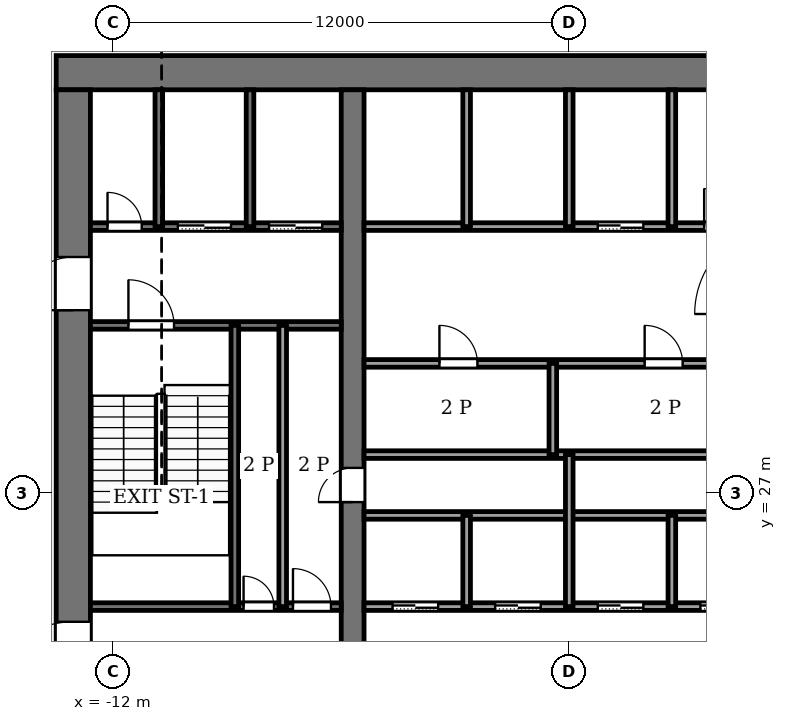
"""IFC4 building model, lengths in metres.
Left out: names, types, materials, properties, quantities, classifications, styles, units other than length and angle.
Written with IfcOpenShell. Run it as: python <this file> out.ifc"""

import sys

from ifc_helpers import new_model, si_unit, direction, frame, frame_2d, origin, place, context, subcontext, project, spatial, rectangle, extrude, element, fill, save


model = new_model("IFC4")
c1 = context("Model", 3, precision=1e-05, world=origin(), true_north=direction((0.0, 1.0)))
c2 = subcontext(c1, "Body", "Model", "MODEL_VIEW")
j1 = project(units=[si_unit("LENGTHUNIT", "METRE"), si_unit("PLANEANGLEUNIT", "RADIAN")], contexts=[c1])
p1 = place(None, origin())
s1 = spatial("IfcSite", under=j1, at=p1, CompositionType="ELEMENT")
p2 = place(p1, origin())
s2 = spatial("IfcBuilding", under=s1, at=p2, CompositionType="ELEMENT")
p3 = place(p2, frame((0.0, 0.0, 202.0)))
s3 = spatial("IfcBuildingStorey", under=s2, at=p3, CompositionType="ELEMENT", Elevation=202.0)
p4 = place(p3, frame((-13.5, 38.05, -0.13), z_axis=(0.0, 0.0, 1.0), x_axis=(1.0, 0.0, 0.0)))
e1 = element("IfcWall", 1, at=p4, inside=s3, PredefinedType="SHEAR", context=c2, shape_type="SweptSolid", body=[
    extrude(rectangle(XDim=27.0, YDim=0.9, at=frame_2d((13.5, 0.0))), origin(), (0.0, 0.0, 1.0), 4.0),
])
p5 = place(p3, frame((-13.05, 18.4, -0.13), z_axis=(0.0, 0.0, 1.0), x_axis=(0.0, 1.0, 0.0)))
e2 = element("IfcWall", 2, at=p5, inside=s3, PredefinedType="SHEAR", context=c2, shape_type="SweptSolid", body=[
    extrude(rectangle(XDim=19.2, YDim=0.9, at=frame_2d((9.6, 0.0))), origin(), (0.0, 0.0, 1.0), 4.0),
])
p6 = place(p5, frame((2.8, 0.0, 0.13)))
e3 = element("IfcOpeningElement", 3, at=p6, cuts=e2, PredefinedType="OPENING", context=c2, shape_type="SweptSolid", body=[
    extrude(rectangle(XDim=2.4, YDim=2.4, at=frame_2d((1.2, 1.2))), frame((0.0, 0.46, 0.0), z_axis=(0.0, -1.0, 0.0), x_axis=(1.0, 0.0, 0.0)), (0.0, 0.0, 1.0), 0.92),
])
p7 = place(p5, frame((13.4, 0.0, 0.13)))
e4 = element("IfcOpeningElement", 4, at=p7, cuts=e2, PredefinedType="OPENING", context=c2, shape_type="SweptSolid", body=[
    extrude(rectangle(XDim=1.4, YDim=2.2, at=frame_2d((0.7, 1.1))), frame((0.0, 0.46, 0.0), z_axis=(0.0, -1.0, 0.0), x_axis=(1.0, 0.0, 0.0)), (0.0, 0.0, 1.0), 0.92),
])
p8 = place(p3, frame((-5.7, 18.4, -0.13), z_axis=(0.0, 0.0, 1.0), x_axis=(0.0, 1.0, 0.0)))
e5 = element("IfcWall", 5, at=p8, inside=s3, PredefinedType="SHEAR", context=c2, shape_type="SweptSolid", body=[
    extrude(rectangle(XDim=19.2, YDim=0.6, at=frame_2d((9.6, 0.0))), origin(), (0.0, 0.0, 1.0), 4.0),
])
p9 = place(p8, frame((8.35, 0.0, 0.13)))
e6 = element("IfcOpeningElement", 6, at=p9, cuts=e5, PredefinedType="OPENING", context=c2, shape_type="SweptSolid", body=[
    extrude(rectangle(XDim=0.9, YDim=2.1, at=frame_2d((0.45, 1.05))), frame((0.0, 0.31, 0.0), z_axis=(0.0, -1.0, 0.0), x_axis=(1.0, 0.0, 0.0)), (0.0, 0.0, 1.0), 0.62),
])
p10 = place(p3, frame((-12.6, 24.0, 0.0), z_axis=(0.0, 0.0, 1.0), x_axis=(1.0, 0.0, 0.0)))
e7 = element("IfcWall", 7, at=p10, inside=s3, PredefinedType="PARTITIONING", context=c2, shape_type="SweptSolid", body=[
    extrude(rectangle(XDim=6.6, YDim=0.2, at=frame_2d((3.3, 0.0))), origin(), (0.0, 0.0, 1.0), 3.87),
])
p11 = place(p10, frame((4.03, 0.0, 0.0)))
e8 = element("IfcOpeningElement", 8, at=p11, cuts=e7, PredefinedType="OPENING", context=c2, shape_type="SweptSolid", body=[
    extrude(rectangle(XDim=0.8, YDim=2.1, at=frame_2d((0.4, 1.05))), frame((0.0, 0.11, 0.0), z_axis=(0.0, -1.0, 0.0), x_axis=(1.0, 0.0, 0.0)), (0.0, 0.0, 1.0), 0.22),
])
p12 = place(p10, frame((5.33, 0.0, 0.0)))
e9 = element("IfcOpeningElement", 9, at=p12, cuts=e7, PredefinedType="OPENING", context=c2, shape_type="SweptSolid", body=[
    extrude(rectangle(XDim=1.0, YDim=2.1, at=frame_2d((0.5, 1.05))), frame((0.0, 0.11, 0.0), z_axis=(0.0, -1.0, 0.0), x_axis=(1.0, 0.0, 0.0)), (0.0, 0.0, 1.0), 0.22),
])
p13 = place(p3, frame((-5.4, 24.0, 0.0), z_axis=(0.0, 0.0, 1.0), x_axis=(1.0, 0.0, 0.0)))
e10 = element("IfcWall", 10, at=p13, inside=s3, PredefinedType="PARTITIONING", context=c2, shape_type="SweptSolid", body=[
    extrude(rectangle(XDim=10.8, YDim=0.2, at=frame_2d((5.4, 0.0))), origin(), (0.0, 0.0, 1.0), 3.87),
])
p14 = place(p13, frame((0.75, 0.0, 0.0)))
e11 = element("IfcOpeningElement", 11, at=p14, cuts=e10, PredefinedType="OPENING", context=c2, shape_type="SweptSolid", body=[
    extrude(rectangle(XDim=1.2, YDim=2.2, at=frame_2d((0.6, 1.1))), frame((0.0, 0.11, 0.0), z_axis=(0.0, -1.0, 0.0), x_axis=(1.0, 0.0, 0.0)), (0.0, 0.0, 1.0), 0.22),
])
p15 = place(p13, frame((3.45, 0.0, 0.0)))
e12 = element("IfcOpeningElement", 12, at=p15, cuts=e10, PredefinedType="OPENING", context=c2, shape_type="SweptSolid", body=[
    extrude(rectangle(XDim=1.2, YDim=2.2, at=frame_2d((0.6, 1.1))), frame((0.0, 0.11, 0.0), z_axis=(0.0, -1.0, 0.0), x_axis=(1.0, 0.0, 0.0)), (0.0, 0.0, 1.0), 0.22),
])
p16 = place(p13, frame((6.15, 0.0, 0.0)))
e13 = element("IfcOpeningElement", 13, at=p16, cuts=e10, PredefinedType="OPENING", context=c2, shape_type="SweptSolid", body=[
    extrude(rectangle(XDim=1.2, YDim=2.2, at=frame_2d((0.6, 1.1))), frame((0.0, 0.11, 0.0), z_axis=(0.0, -1.0, 0.0), x_axis=(1.0, 0.0, 0.0)), (0.0, 0.0, 1.0), 0.22),
])
p17 = place(p13, frame((8.85, 0.0, 0.0)))
e14 = element("IfcOpeningElement", 14, at=p17, cuts=e10, PredefinedType="OPENING", context=c2, shape_type="SweptSolid", body=[
    extrude(rectangle(XDim=1.2, YDim=2.2, at=frame_2d((0.6, 1.1))), frame((0.0, 0.11, 0.0), z_axis=(0.0, -1.0, 0.0), x_axis=(1.0, 0.0, 0.0)), (0.0, 0.0, 1.0), 0.22),
])
for number, where, z_axis, x_axis in (
    (15, (-5.4, 26.4, 0.0), (0.0, 0.0, 1.0), (1.0, 0.0, 0.0)),
    (16, (-5.4, 28.0, 0.0), (0.0, 0.0, 1.0), (1.0, 0.0, 0.0)),
):
    element("IfcWall", number, at=place(p3, frame(where, z_axis=z_axis, x_axis=x_axis)), inside=s3, PredefinedType="PARTITIONING", context=c2, shape_type="SweptSolid", body=[
        extrude(rectangle(XDim=10.8, YDim=0.2, at=frame_2d((5.4, 0.0))), origin(), (0.0, 0.0, 1.0), 3.87),
    ])
p18 = place(p3, frame((-5.4, 30.4, 0.0), z_axis=(0.0, 0.0, 1.0), x_axis=(1.0, 0.0, 0.0)))
e17 = element("IfcWall", 17, at=p18, inside=s3, PredefinedType="PARTITIONING", context=c2, shape_type="SweptSolid", body=[
    extrude(rectangle(XDim=10.8, YDim=0.2, at=frame_2d((5.4, 0.0))), origin(), (0.0, 0.0, 1.0), 3.87),
])
p19 = place(p18, frame((1.984, 0.0, 0.0)))
e18 = element("IfcOpeningElement", 18, at=p19, cuts=e17, PredefinedType="OPENING", context=c2, shape_type="SweptSolid", body=[
    extrude(rectangle(XDim=1.0, YDim=2.1, at=frame_2d((0.5, 1.05))), frame((0.0, 0.11, 0.0), z_axis=(0.0, -1.0, 0.0), x_axis=(1.0, 0.0, 0.0)), (0.0, 0.0, 1.0), 0.22),
])
p20 = place(p18, frame((7.384, 0.0, 0.0)))
e19 = element("IfcOpeningElement", 19, at=p20, cuts=e17, PredefinedType="OPENING", context=c2, shape_type="SweptSolid", body=[
    extrude(rectangle(XDim=1.0, YDim=2.1, at=frame_2d((0.5, 1.05))), frame((0.0, 0.11, 0.0), z_axis=(0.0, -1.0, 0.0), x_axis=(1.0, 0.0, 0.0)), (0.0, 0.0, 1.0), 0.22),
])
p21 = place(p3, frame((-12.6, 31.4, 0.0), z_axis=(0.0, 0.0, 1.0), x_axis=(1.0, 0.0, 0.0)))
e20 = element("IfcWall", 20, at=p21, inside=s3, PredefinedType="PARTITIONING", context=c2, shape_type="SweptSolid", body=[
    extrude(rectangle(XDim=6.6, YDim=0.2, at=frame_2d((3.3, 0.0))), origin(), (0.0, 0.0, 1.0), 3.87),
])
p22 = place(p21, frame((1.0, 0.0, 0.0)))
e21 = element("IfcOpeningElement", 21, at=p22, cuts=e20, PredefinedType="OPENING", context=c2, shape_type="SweptSolid", body=[
    extrude(rectangle(XDim=1.2, YDim=2.2, at=frame_2d((0.6, 1.1))), frame((0.0, 0.11, 0.0), z_axis=(0.0, -1.0, 0.0), x_axis=(1.0, 0.0, 0.0)), (0.0, 0.0, 1.0), 0.22),
])
p23 = place(p3, frame((-12.6, 34.0, 0.0), z_axis=(0.0, 0.0, 1.0), x_axis=(1.0, 0.0, 0.0)))
e22 = element("IfcWall", 22, at=p23, inside=s3, PredefinedType="PARTITIONING", context=c2, shape_type="SweptSolid", body=[
    extrude(rectangle(XDim=6.6, YDim=0.2, at=frame_2d((3.3, 0.0))), origin(), (0.0, 0.0, 1.0), 3.87),
])
p24 = place(p23, frame((4.7, 0.0, 0.0)))
e23 = element("IfcOpeningElement", 23, at=p24, cuts=e22, PredefinedType="OPENING", context=c2, shape_type="SweptSolid", body=[
    extrude(rectangle(XDim=1.4, YDim=2.2, at=frame_2d((0.7, 1.1))), frame((0.0, 0.11, 0.0), z_axis=(0.0, -1.0, 0.0), x_axis=(1.0, 0.0, 0.0)), (0.0, 0.0, 1.0), 0.22),
])
p25 = place(p23, frame((2.3, 0.0, 0.0)))
e24 = element("IfcOpeningElement", 24, at=p25, cuts=e22, PredefinedType="OPENING", context=c2, shape_type="SweptSolid", body=[
    extrude(rectangle(XDim=1.4, YDim=2.2, at=frame_2d((0.7, 1.1))), frame((0.0, 0.11, 0.0), z_axis=(0.0, -1.0, 0.0), x_axis=(1.0, 0.0, 0.0)), (0.0, 0.0, 1.0), 0.22),
])
p26 = place(p23, frame((0.45, 0.0, 0.0)))
e25 = element("IfcOpeningElement", 25, at=p26, cuts=e22, PredefinedType="OPENING", context=c2, shape_type="SweptSolid", body=[
    extrude(rectangle(XDim=0.9, YDim=2.1, at=frame_2d((0.45, 1.05))), frame((0.0, 0.11, 0.0), z_axis=(0.0, -1.0, 0.0), x_axis=(1.0, 0.0, 0.0)), (0.0, 0.0, 1.0), 0.22),
])
p27 = place(p3, frame((-5.4, 34.0, 0.0), z_axis=(0.0, 0.0, 1.0), x_axis=(1.0, 0.0, 0.0)))
e26 = element("IfcWall", 26, at=p27, inside=s3, PredefinedType="PARTITIONING", context=c2, shape_type="SweptSolid", body=[
    extrude(rectangle(XDim=10.8, YDim=0.2, at=frame_2d((5.4, 0.0))), origin(), (0.0, 0.0, 1.0), 3.87),
])
p28 = place(p27, frame((6.15, 0.0, 0.0)))
e27 = element("IfcOpeningElement", 27, at=p28, cuts=e26, PredefinedType="OPENING", context=c2, shape_type="SweptSolid", body=[
    extrude(rectangle(XDim=1.2, YDim=2.2, at=frame_2d((0.6, 1.1))), frame((0.0, 0.11, 0.0), z_axis=(0.0, -1.0, 0.0), x_axis=(1.0, 0.0, 0.0)), (0.0, 0.0, 1.0), 0.22),
])
p29 = place(p27, frame((8.95, 0.0, 0.0)))
e28 = element("IfcOpeningElement", 28, at=p29, cuts=e26, PredefinedType="OPENING", context=c2, shape_type="SweptSolid", body=[
    extrude(rectangle(XDim=1.0, YDim=2.1, at=frame_2d((0.5, 1.05))), frame((0.0, 0.11, 0.0), z_axis=(0.0, -1.0, 0.0), x_axis=(1.0, 0.0, 0.0)), (0.0, 0.0, 1.0), 0.22),
])
p30 = place(p3, frame((-10.8, 34.0, 0.0), z_axis=(0.0, 0.0, 1.0), x_axis=(0.0, 1.0, 0.0)))
e29 = element("IfcWall", 29, at=p30, inside=s3, PredefinedType="PARTITIONING", context=c2, shape_type="SweptSolid", body=[
    extrude(rectangle(XDim=3.6, YDim=0.2, at=frame_2d((1.8, 0.0))), origin(), (0.0, 0.0, 1.0), 3.87),
])
p31 = place(p3, frame((-8.8, 24.0, 0.0), z_axis=(0.0, 0.0, 1.0), x_axis=(0.0, 1.0, 0.0)))
e30 = element("IfcWall", 30, at=p31, inside=s3, PredefinedType="PARTITIONING", context=c2, shape_type="SweptSolid", body=[
    extrude(rectangle(XDim=7.4, YDim=0.2, at=frame_2d((3.7, 0.0))), origin(), (0.0, 0.0, 1.0), 3.87),
])
p32 = place(p3, frame((-8.4, 34.0, 0.0), z_axis=(0.0, 0.0, 1.0), x_axis=(0.0, 1.0, 0.0)))
e31 = element("IfcWall", 31, at=p32, inside=s3, PredefinedType="PARTITIONING", context=c2, shape_type="SweptSolid", body=[
    extrude(rectangle(XDim=3.6, YDim=0.2, at=frame_2d((1.8, 0.0))), origin(), (0.0, 0.0, 1.0), 3.87),
])
p33 = place(p3, frame((-7.54, 24.0, 0.0), z_axis=(0.0, 0.0, 1.0), x_axis=(0.0, 1.0, 0.0)))
e32 = element("IfcWall", 32, at=p33, inside=s3, PredefinedType="PARTITIONING", context=c2, shape_type="SweptSolid", body=[
    extrude(rectangle(XDim=7.4, YDim=0.2, at=frame_2d((3.7, 0.0))), origin(), (0.0, 0.0, 1.0), 3.87),
])
p34 = place(p3, frame((-2.7, 24.0, 0.0), z_axis=(0.0, 0.0, 1.0), x_axis=(0.0, 1.0, 0.0)))
e33 = element("IfcWall", 33, at=p34, inside=s3, PredefinedType="PARTITIONING", context=c2, shape_type="SweptSolid", body=[
    extrude(rectangle(XDim=2.4, YDim=0.2, at=frame_2d((1.2, 0.0))), origin(), (0.0, 0.0, 1.0), 3.87),
])
p35 = place(p3, frame((-2.7, 34.0, 0.0), z_axis=(0.0, 0.0, 1.0), x_axis=(0.0, 1.0, 0.0)))
e34 = element("IfcWall", 34, at=p35, inside=s3, PredefinedType="PARTITIONING", context=c2, shape_type="SweptSolid", body=[
    extrude(rectangle(XDim=3.6, YDim=0.2, at=frame_2d((1.8, 0.0))), origin(), (0.0, 0.0, 1.0), 3.87),
])
p36 = place(p3, frame((-0.432, 28.0, 0.0), z_axis=(0.0, 0.0, 1.0), x_axis=(0.0, 1.0, 0.0)))
e35 = element("IfcWall", 35, at=p36, inside=s3, PredefinedType="PARTITIONING", context=c2, shape_type="SweptSolid", body=[
    extrude(rectangle(XDim=2.4, YDim=0.2, at=frame_2d((1.2, 0.0))), origin(), (0.0, 0.0, 1.0), 3.87),
])
p37 = place(p3, frame((0.0, 24.0, 0.0), z_axis=(0.0, 0.0, 1.0), x_axis=(0.0, 1.0, 0.0)))
e36 = element("IfcWall", 36, at=p37, inside=s3, PredefinedType="PARTITIONING", context=c2, shape_type="SweptSolid", body=[
    extrude(rectangle(XDim=4.0, YDim=0.2, at=frame_2d((2.0, 0.0))), origin(), (0.0, 0.0, 1.0), 3.87),
])
p38 = place(p3, frame((0.0, 34.0, 0.0), z_axis=(0.0, 0.0, 1.0), x_axis=(0.0, 1.0, 0.0)))
e37 = element("IfcWall", 37, at=p38, inside=s3, PredefinedType="PARTITIONING", context=c2, shape_type="SweptSolid", body=[
    extrude(rectangle(XDim=3.6, YDim=0.2, at=frame_2d((1.8, 0.0))), origin(), (0.0, 0.0, 1.0), 3.87),
])
p39 = place(p3, frame((2.7, 24.0, 0.0), z_axis=(0.0, 0.0, 1.0), x_axis=(0.0, 1.0, 0.0)))
e38 = element("IfcWall", 38, at=p39, inside=s3, PredefinedType="PARTITIONING", context=c2, shape_type="SweptSolid", body=[
    extrude(rectangle(XDim=2.4, YDim=0.2, at=frame_2d((1.2, 0.0))), origin(), (0.0, 0.0, 1.0), 3.87),
])
p40 = place(p3, frame((2.7, 34.0, 0.0), z_axis=(0.0, 0.0, 1.0), x_axis=(0.0, 1.0, 0.0)))
e39 = element("IfcWall", 39, at=p40, inside=s3, PredefinedType="PARTITIONING", context=c2, shape_type="SweptSolid", body=[
    extrude(rectangle(XDim=3.6, YDim=0.2, at=frame_2d((1.8, 0.0))), origin(), (0.0, 0.0, 1.0), 3.87),
])
p41 = place(p14, origin())
e40 = element("IfcDoor", 40, at=p41, inside=s3, OperationType="SLIDING_TO_LEFT", PredefinedType="DOOR", context=c2, shape_type="SweptSolid", body=[
    extrude(rectangle(XDim=1.2, YDim=2.2, at=frame_2d((0.6, 1.1))), frame((0.0, 0.025, 0.0), z_axis=(0.0, -1.0, 0.0), x_axis=(1.0, 0.0, 0.0)), (0.0, 0.0, 1.0), 0.05),
])
fill(e11, e40)
p42 = place(p15, origin())
e41 = element("IfcDoor", 41, at=p42, inside=s3, OperationType="SLIDING_TO_LEFT", PredefinedType="DOOR", context=c2, shape_type="SweptSolid", body=[
    extrude(rectangle(XDim=1.2, YDim=2.2, at=frame_2d((0.6, 1.1))), frame((0.0, 0.025, 0.0), z_axis=(0.0, -1.0, 0.0), x_axis=(1.0, 0.0, 0.0)), (0.0, 0.0, 1.0), 0.05),
])
fill(e12, e41)
p43 = place(p16, origin())
e42 = element("IfcDoor", 42, at=p43, inside=s3, OperationType="SLIDING_TO_LEFT", PredefinedType="DOOR", context=c2, shape_type="SweptSolid", body=[
    extrude(rectangle(XDim=1.2, YDim=2.2, at=frame_2d((0.6, 1.1))), frame((0.0, 0.025, 0.0), z_axis=(0.0, -1.0, 0.0), x_axis=(1.0, 0.0, 0.0)), (0.0, 0.0, 1.0), 0.05),
])
fill(e13, e42)
p44 = place(p17, origin())
e43 = element("IfcDoor", 43, at=p44, inside=s3, OperationType="SLIDING_TO_LEFT", PredefinedType="DOOR", context=c2, shape_type="SweptSolid", body=[
    extrude(rectangle(XDim=1.2, YDim=2.2, at=frame_2d((0.6, 1.1))), frame((0.0, 0.025, 0.0), z_axis=(0.0, -1.0, 0.0), x_axis=(1.0, 0.0, 0.0)), (0.0, 0.0, 1.0), 0.05),
])
fill(e14, e43)
p45 = place(p28, origin())
e44 = element("IfcDoor", 44, at=p45, inside=s3, OperationType="SLIDING_TO_LEFT", PredefinedType="DOOR", context=c2, shape_type="SweptSolid", body=[
    extrude(rectangle(XDim=1.2, YDim=2.2, at=frame_2d((0.6, 1.1))), frame((0.0, 0.025, 0.0), z_axis=(0.0, -1.0, 0.0), x_axis=(1.0, 0.0, 0.0)), (0.0, 0.0, 1.0), 0.05),
])
fill(e27, e44)
p46 = place(p24, origin())
e45 = element("IfcDoor", 45, at=p46, inside=s3, OperationType="SLIDING_TO_LEFT", PredefinedType="DOOR", context=c2, shape_type="SweptSolid", body=[
    extrude(rectangle(XDim=1.4, YDim=2.2, at=frame_2d((0.7, 1.1))), frame((0.0, 0.025, 0.0), z_axis=(0.0, -1.0, 0.0), x_axis=(1.0, 0.0, 0.0)), (0.0, 0.0, 1.0), 0.05),
])
fill(e23, e45)
p47 = place(p25, origin())
e46 = element("IfcDoor", 46, at=p47, inside=s3, OperationType="SLIDING_TO_LEFT", PredefinedType="DOOR", context=c2, shape_type="SweptSolid", body=[
    extrude(rectangle(XDim=1.4, YDim=2.2, at=frame_2d((0.7, 1.1))), frame((0.0, 0.025, 0.0), z_axis=(0.0, -1.0, 0.0), x_axis=(1.0, 0.0, 0.0)), (0.0, 0.0, 1.0), 0.05),
])
fill(e24, e46)
p48 = place(p26, origin())
e47 = element("IfcDoor", 47, at=p48, inside=s3, OperationType="SINGLE_SWING_RIGHT", PredefinedType="DOOR", context=c2, shape_type="SweptSolid", body=[
    extrude(rectangle(XDim=0.9, YDim=2.1, at=frame_2d((0.45, 1.05))), frame((0.0, 0.025, 0.0), z_axis=(0.0, -1.0, 0.0), x_axis=(1.0, 0.0, 0.0)), (0.0, 0.0, 1.0), 0.05),
])
fill(e25, e47)
p49 = place(p19, origin())
e48 = element("IfcDoor", 48, at=p49, inside=s3, OperationType="SINGLE_SWING_LEFT", PredefinedType="DOOR", context=c2, shape_type="SweptSolid", body=[
    extrude(rectangle(XDim=1.0, YDim=2.1, at=frame_2d((0.5, 1.05))), frame((0.0, 0.025, 0.0), z_axis=(0.0, -1.0, 0.0), x_axis=(1.0, 0.0, 0.0)), (0.0, 0.0, 1.0), 0.05),
])
fill(e18, e48)
p50 = place(p20, origin())
e49 = element("IfcDoor", 49, at=p50, inside=s3, OperationType="SINGLE_SWING_RIGHT", PredefinedType="DOOR", context=c2, shape_type="SweptSolid", body=[
    extrude(rectangle(XDim=1.0, YDim=2.1, at=frame_2d((0.5, 1.05))), frame((0.0, 0.025, 0.0), z_axis=(0.0, -1.0, 0.0), x_axis=(1.0, 0.0, 0.0)), (0.0, 0.0, 1.0), 0.05),
])
fill(e19, e49)
p51 = place(p11, origin())
e50 = element("IfcDoor", 50, at=p51, inside=s3, OperationType="SINGLE_SWING_RIGHT", PredefinedType="DOOR", context=c2, shape_type="SweptSolid", body=[
    extrude(rectangle(XDim=0.8, YDim=2.1, at=frame_2d((0.4, 1.05))), frame((0.0, 0.025, 0.0), z_axis=(0.0, -1.0, 0.0), x_axis=(1.0, 0.0, 0.0)), (0.0, 0.0, 1.0), 0.05),
])
fill(e8, e50)
p52 = place(p12, origin())
e51 = element("IfcDoor", 51, at=p52, inside=s3, OperationType="SINGLE_SWING_LEFT", PredefinedType="DOOR", context=c2, shape_type="SweptSolid", body=[
    extrude(rectangle(XDim=1.0, YDim=2.1, at=frame_2d((0.5, 1.05))), frame((0.0, 0.025, 0.0), z_axis=(0.0, -1.0, 0.0), x_axis=(1.0, 0.0, 0.0)), (0.0, 0.0, 1.0), 0.05),
])
fill(e9, e51)
p53 = place(p29, origin())
e52 = element("IfcDoor", 52, at=p53, inside=s3, OperationType="SINGLE_SWING_LEFT", PredefinedType="DOOR", context=c2, shape_type="SweptSolid", body=[
    extrude(rectangle(XDim=1.0, YDim=2.1, at=frame_2d((0.5, 1.05))), frame((0.0, 0.025, 0.0), z_axis=(0.0, -1.0, 0.0), x_axis=(1.0, 0.0, 0.0)), (0.0, 0.0, 1.0), 0.05),
])
fill(e28, e52)
p54 = place(p9, origin())
e53 = element("IfcDoor", 53, at=p54, inside=s3, OperationType="SINGLE_SWING_RIGHT", PredefinedType="DOOR", context=c2, shape_type="SweptSolid", body=[
    extrude(rectangle(XDim=0.9, YDim=2.1, at=frame_2d((0.45, 1.05))), frame((0.0, 0.025, 0.0), z_axis=(0.0, -1.0, 0.0), x_axis=(1.0, 0.0, 0.0)), (0.0, 0.0, 1.0), 0.05),
])
fill(e6, e53)
p55 = place(p22, origin())
e54 = element("IfcDoor", 54, at=p55, inside=s3, OperationType="SINGLE_SWING_LEFT", PredefinedType="DOOR", context=c2, shape_type="SweptSolid", body=[
    extrude(rectangle(XDim=1.2, YDim=2.2, at=frame_2d((0.6, 1.1))), frame((0.0, 0.025, 0.0), z_axis=(0.0, -1.0, 0.0), x_axis=(1.0, 0.0, 0.0)), (0.0, 0.0, 1.0), 0.05),
])
fill(e21, e54)
p56 = place(p6, origin())
e55 = element("IfcDoor", 55, at=p56, inside=s3, OperationType="DOUBLE_DOOR_SINGLE_SWING", PredefinedType="DOOR", context=c2, shape_type="SweptSolid", body=[
    extrude(rectangle(XDim=2.4, YDim=2.4, at=frame_2d((1.2, 1.2))), frame((0.0, 0.025, 0.0), z_axis=(0.0, -1.0, 0.0), x_axis=(1.0, 0.0, 0.0)), (0.0, 0.0, 1.0), 0.05),
])
fill(e3, e55)
p57 = place(p7, origin())
e56 = element("IfcDoor", 56, at=p57, inside=s3, OperationType="SINGLE_SWING_LEFT", PredefinedType="DOOR", context=c2, shape_type="SweptSolid", body=[
    extrude(rectangle(XDim=1.4, YDim=2.2, at=frame_2d((0.7, 1.1))), frame((0.0, 0.025, 0.0), z_axis=(0.0, -1.0, 0.0), x_axis=(1.0, 0.0, 0.0)), (0.0, 0.0, 1.0), 0.05),
])
fill(e4, e56)
save(model, sys.argv[1])
